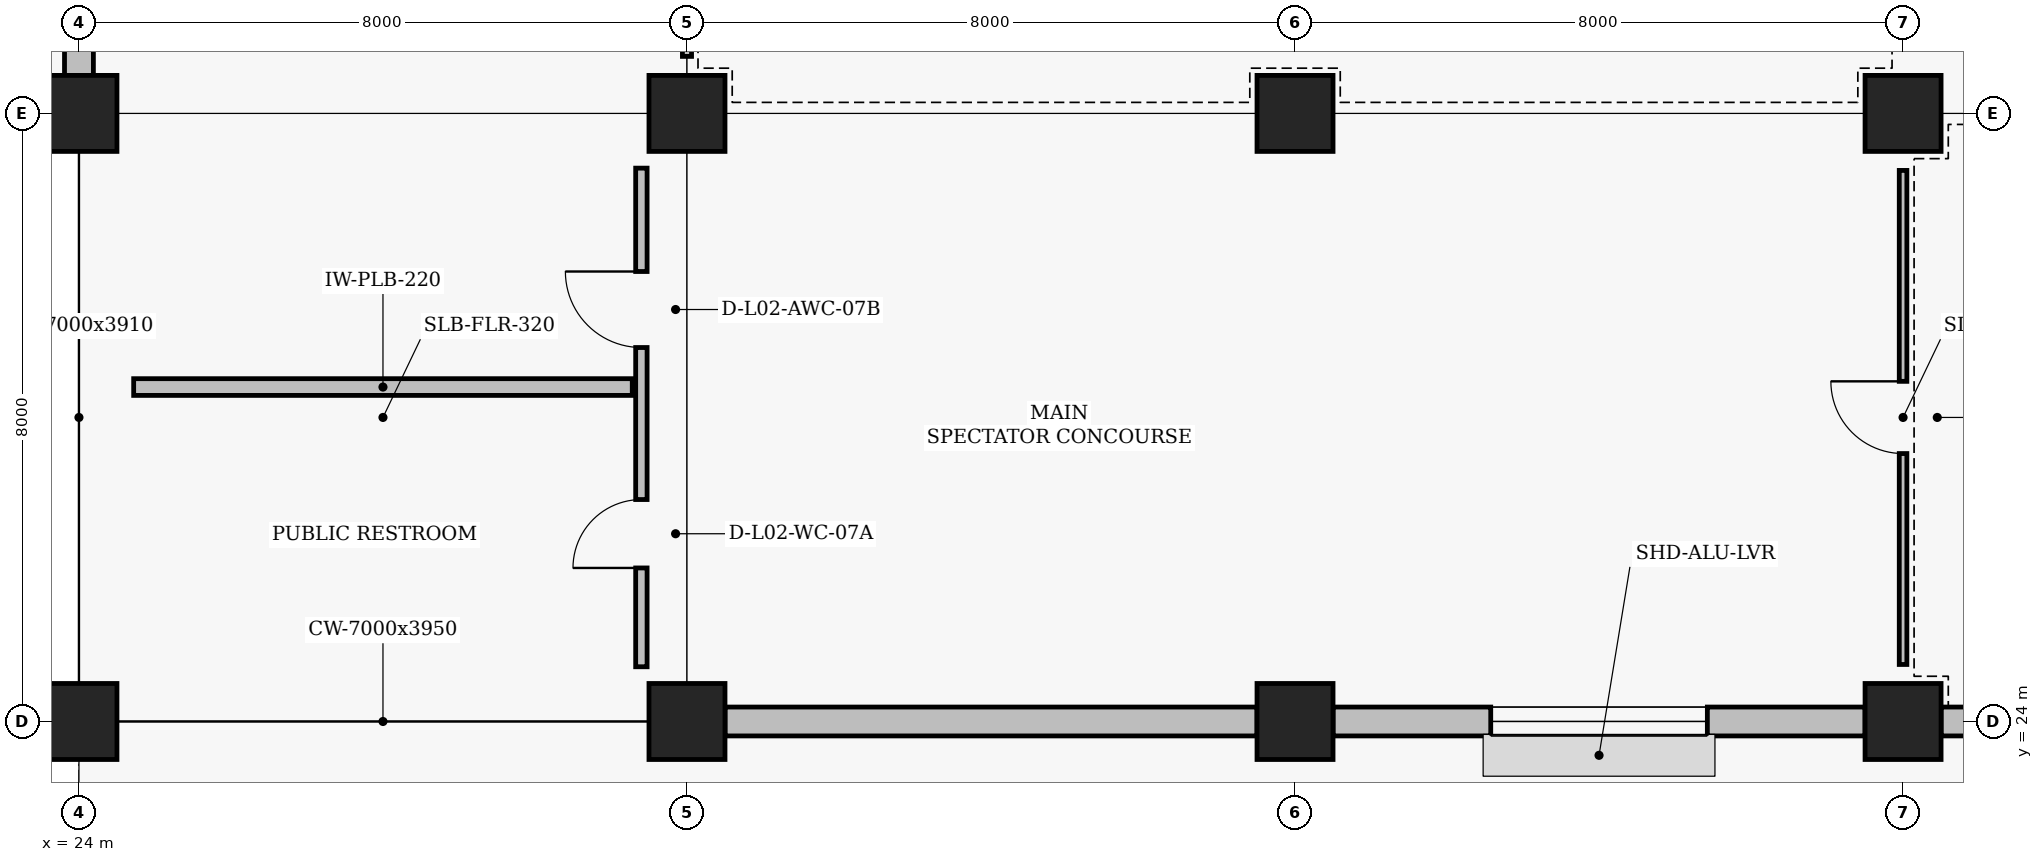
"""IFC4 building model, lengths in metres.
Left out: names, types, materials, properties, quantities, classifications, styles, units other than length and angle.
Written with IfcOpenShell. Run it as: python <this file> out.ifc"""

import sys

from ifc_helpers import new_model, si_unit, direction, frame, frame_2d, origin, origin_2d, place, context, subcontext, project, spatial, rectangle, extrude, element, fill, save


model = new_model("IFC4")
c1 = context("Model", 3, precision=1e-05, world=origin(), true_north=direction((0.0, 1.0)))
c2 = subcontext(c1, "Body", "Model", "MODEL_VIEW")
j1 = project(units=[si_unit("LENGTHUNIT", "METRE"), si_unit("PLANEANGLEUNIT", "RADIAN")], contexts=[c1])
p1 = place(None, origin())
s1 = spatial("IfcSite", under=j1, at=p1, CompositionType="ELEMENT")
p2 = place(p1, origin())
s2 = spatial("IfcBuilding", under=s1, at=p2, CompositionType="ELEMENT")
p3 = place(p2, frame((0.0, 0.0, 4.8)))
s3 = spatial("IfcBuildingStorey", under=s2, at=p3, CompositionType="ELEMENT", Elevation=4.8)
for number, where, z_axis, x_axis in (
    (1, (24.0, 24.0, 0.0), (0.0, 0.0, 1.0), (1.0, 0.0, 0.0)),
    (2, (24.0, 32.0, 0.0), (0.0, 0.0, 1.0), (1.0, 0.0, 0.0)),
    (3, (32.0, 24.0, 0.0), (0.0, 0.0, 1.0), (1.0, 0.0, 0.0)),
    (4, (32.0, 32.0, 0.0), (0.0, 0.0, 1.0), (1.0, 0.0, 0.0)),
    (5, (40.0, 24.0, 0.0), (0.0, 0.0, 1.0), (1.0, 0.0, 0.0)),
    (6, (40.0, 32.0, 0.0), (0.0, 0.0, 1.0), (1.0, 0.0, 0.0)),
    (7, (48.0, 24.0, 0.0), (0.0, 0.0, 1.0), (1.0, 0.0, 0.0)),
    (8, (48.0, 32.0, 0.0), (0.0, 0.0, 1.0), (1.0, 0.0, 0.0)),
):
    element("IfcColumn", number, at=place(p3, frame(where, z_axis=z_axis, x_axis=x_axis)), inside=s3, PredefinedType="COLUMN", context=c2, shape_type="SweptSolid", body=[
        extrude(rectangle(XDim=1.0, YDim=1.0, at=origin_2d()), origin(), (0.0, 0.0, 1.0), 4.8),
    ])
p4 = place(p3, frame((24.0, 32.5, 0.0), z_axis=(0.0, 0.0, 1.0), x_axis=(0.0, 1.0, 0.0)))
e9 = element("IfcWall", 9, at=p4, inside=s3, PredefinedType="SOLIDWALL", context=c2, shape_type="SweptSolid", body=[
    extrude(rectangle(XDim=7.0, YDim=0.38, at=frame_2d((3.5, 0.0))), origin(), (0.0, 0.0, 1.0), 3.91),
])
p5 = place(p3, frame((32.5, 24.0, 0.0), z_axis=(0.0, 0.0, 1.0), x_axis=(1.0, 0.0, 0.0)))
e10 = element("IfcWall", 10, at=p5, inside=s3, PredefinedType="SOLIDWALL", context=c2, shape_type="SweptSolid", body=[
    extrude(rectangle(XDim=7.0, YDim=0.38, at=frame_2d((3.5, 0.0))), origin(), (0.0, 0.0, 1.0), 3.95),
])
p6 = place(p3, frame((40.5, 24.0, 0.0), z_axis=(0.0, 0.0, 1.0), x_axis=(1.0, 0.0, 0.0)))
e11 = element("IfcWall", 11, at=p6, inside=s3, PredefinedType="SOLIDWALL", context=c2, shape_type="SweptSolid", body=[
    extrude(rectangle(XDim=7.0, YDim=0.38, at=frame_2d((3.5, 0.0))), origin(), (0.0, 0.0, 1.0), 3.95),
])
p7 = place(p6, frame((2.075, 0.0, 0.95)))
e12 = element("IfcOpeningElement", 12, at=p7, cuts=e11, PredefinedType="OPENING", context=c2, shape_type="SweptSolid", body=[
    extrude(rectangle(XDim=2.85, YDim=2.1, at=frame_2d((1.425, 1.05))), frame((0.0, 0.2, 0.0), z_axis=(0.0, -1.0, 0.0), x_axis=(1.0, 0.0, 0.0)), (0.0, 0.0, 1.0), 0.4),
])
p8 = place(p3, frame((48.5, 24.0, 0.0), z_axis=(0.0, 0.0, 1.0), x_axis=(1.0, 0.0, 0.0)))
e13 = element("IfcWall", 13, at=p8, inside=s3, PredefinedType="SOLIDWALL", context=c2, shape_type="SweptSolid", body=[
    extrude(rectangle(XDim=7.0, YDim=0.38, at=frame_2d((3.5, 0.0))), origin(), (0.0, 0.0, 1.0), 3.95),
])
p9 = place(p3, frame((24.72, 28.4, 0.0), z_axis=(0.0, 0.0, 1.0), x_axis=(1.0, 0.0, 0.0)))
e14 = element("IfcWall", 14, at=p9, inside=s3, PredefinedType="PLUMBINGWALL", context=c2, shape_type="SweptSolid", body=[
    extrude(rectangle(XDim=6.56, YDim=0.22, at=frame_2d((3.28, 0.0))), origin(), (0.0, 0.0, 1.0), 4.17),
])
p10 = place(p3, frame((31.4, 24.72, 0.0), z_axis=(0.0, 0.0, 1.0), x_axis=(0.0, 1.0, 0.0)))
e15 = element("IfcWall", 15, at=p10, inside=s3, PredefinedType="PARTITIONING", context=c2, shape_type="SweptSolid", body=[
    extrude(rectangle(XDim=6.56, YDim=0.15, at=frame_2d((3.28, 0.0))), origin(), (0.0, 0.0, 1.0), 4.17),
])
p11 = place(p10, frame((1.3, 0.0, 0.0)))
e16 = element("IfcOpeningElement", 16, at=p11, cuts=e15, PredefinedType="OPENING", context=c2, shape_type="SweptSolid", body=[
    extrude(rectangle(XDim=0.9, YDim=2.1, at=frame_2d((0.45, 1.05))), frame((0.0, 0.085, 0.0), z_axis=(0.0, -1.0, 0.0), x_axis=(1.0, 0.0, 0.0)), (0.0, 0.0, 1.0), 0.17),
])
p12 = place(p10, frame((4.2, 0.0, 0.0)))
e17 = element("IfcOpeningElement", 17, at=p12, cuts=e15, PredefinedType="OPENING", context=c2, shape_type="SweptSolid", body=[
    extrude(rectangle(XDim=1.0, YDim=2.15, at=frame_2d((0.5, 1.075))), frame((0.0, 0.085, 0.0), z_axis=(0.0, -1.0, 0.0), x_axis=(1.0, 0.0, 0.0)), (0.0, 0.0, 1.0), 0.17),
])
p13 = place(p3, frame((32.0, 32.75, 0.0), z_axis=(0.0, 0.0, 1.0), x_axis=(0.0, 1.0, 0.0)))
e18 = element("IfcWall", 18, at=p13, inside=s3, PredefinedType="PARTITIONING", context=c2, shape_type="SweptSolid", body=[
    extrude(rectangle(XDim=6.5, YDim=0.12, at=frame_2d((3.25, 0.0))), origin(), (0.0, 0.0, 1.0), 3.91),
])
p14 = place(p13, frame((2.75, 0.0, 0.0)))
e19 = element("IfcOpeningElement", 19, at=p14, cuts=e18, PredefinedType="OPENING", context=c2, shape_type="SweptSolid", body=[
    extrude(rectangle(XDim=1.0, YDim=2.1, at=frame_2d((0.5, 1.05))), frame((0.0, 0.07, 0.0), z_axis=(0.0, -1.0, 0.0), x_axis=(1.0, 0.0, 0.0)), (0.0, 0.0, 1.0), 0.14),
])
p15 = place(p3, frame((48.0, 24.75, 0.0), z_axis=(0.0, 0.0, 1.0), x_axis=(0.0, 1.0, 0.0)))
e20 = element("IfcWall", 20, at=p15, inside=s3, PredefinedType="PARTITIONING", context=c2, shape_type="SweptSolid", body=[
    extrude(rectangle(XDim=6.5, YDim=0.1, at=frame_2d((3.25, 0.0))), origin(), (0.0, 0.0, 1.0), 3.97),
])
p16 = place(p15, frame((2.775, 0.0, 0.0)))
e21 = element("IfcOpeningElement", 21, at=p16, cuts=e20, PredefinedType="OPENING", context=c2, shape_type="SweptSolid", body=[
    extrude(rectangle(XDim=0.95, YDim=2.1, at=frame_2d((0.475, 1.05))), frame((0.0, 0.06, 0.0), z_axis=(0.0, -1.0, 0.0), x_axis=(1.0, 0.0, 0.0)), (0.0, 0.0, 1.0), 0.12),
])
p17 = place(p7, origin())
e22 = element("IfcWindow", 22, at=p17, inside=s3, PartitioningType="SINGLE_PANEL", PredefinedType="WINDOW", context=c2, shape_type="SweptSolid", body=[
    extrude(rectangle(XDim=2.85, YDim=2.1, at=frame_2d((1.425, 1.05))), frame((0.0, 0.03, 0.0), z_axis=(0.0, -1.0, 0.0), x_axis=(1.0, 0.0, 0.0)), (0.0, 0.0, 1.0), 0.06),
])
fill(e12, e22)
p18 = place(p11, origin())
e23 = element("IfcDoor", 23, at=p18, inside=s3, OperationType="SINGLE_SWING_LEFT", PredefinedType="DOOR", context=c2, shape_type="SweptSolid", body=[
    extrude(rectangle(XDim=0.9, YDim=2.1, at=frame_2d((0.45, 1.05))), frame((0.0, 0.025, 0.0), z_axis=(0.0, -1.0, 0.0), x_axis=(1.0, 0.0, 0.0)), (0.0, 0.0, 1.0), 0.05),
])
fill(e16, e23)
p19 = place(p12, origin())
e24 = element("IfcDoor", 24, at=p19, inside=s3, OperationType="SINGLE_SWING_RIGHT", PredefinedType="DOOR", context=c2, shape_type="SweptSolid", body=[
    extrude(rectangle(XDim=1.0, YDim=2.15, at=frame_2d((0.5, 1.075))), frame((0.0, 0.025, 0.0), z_axis=(0.0, -1.0, 0.0), x_axis=(1.0, 0.0, 0.0)), (0.0, 0.0, 1.0), 0.05),
])
fill(e17, e24)
p20 = place(p16, origin())
e25 = element("IfcDoor", 25, at=p20, inside=s3, OperationType="SINGLE_SWING_RIGHT", PredefinedType="DOOR", context=c2, shape_type="SweptSolid", body=[
    extrude(rectangle(XDim=0.95, YDim=2.1, at=frame_2d((0.475, 1.05))), frame((0.0, 0.025, 0.0), z_axis=(0.0, -1.0, 0.0), x_axis=(1.0, 0.0, 0.0)), (0.0, 0.0, 1.0), 0.05),
])
fill(e21, e25)
save(model, sys.argv[1])
